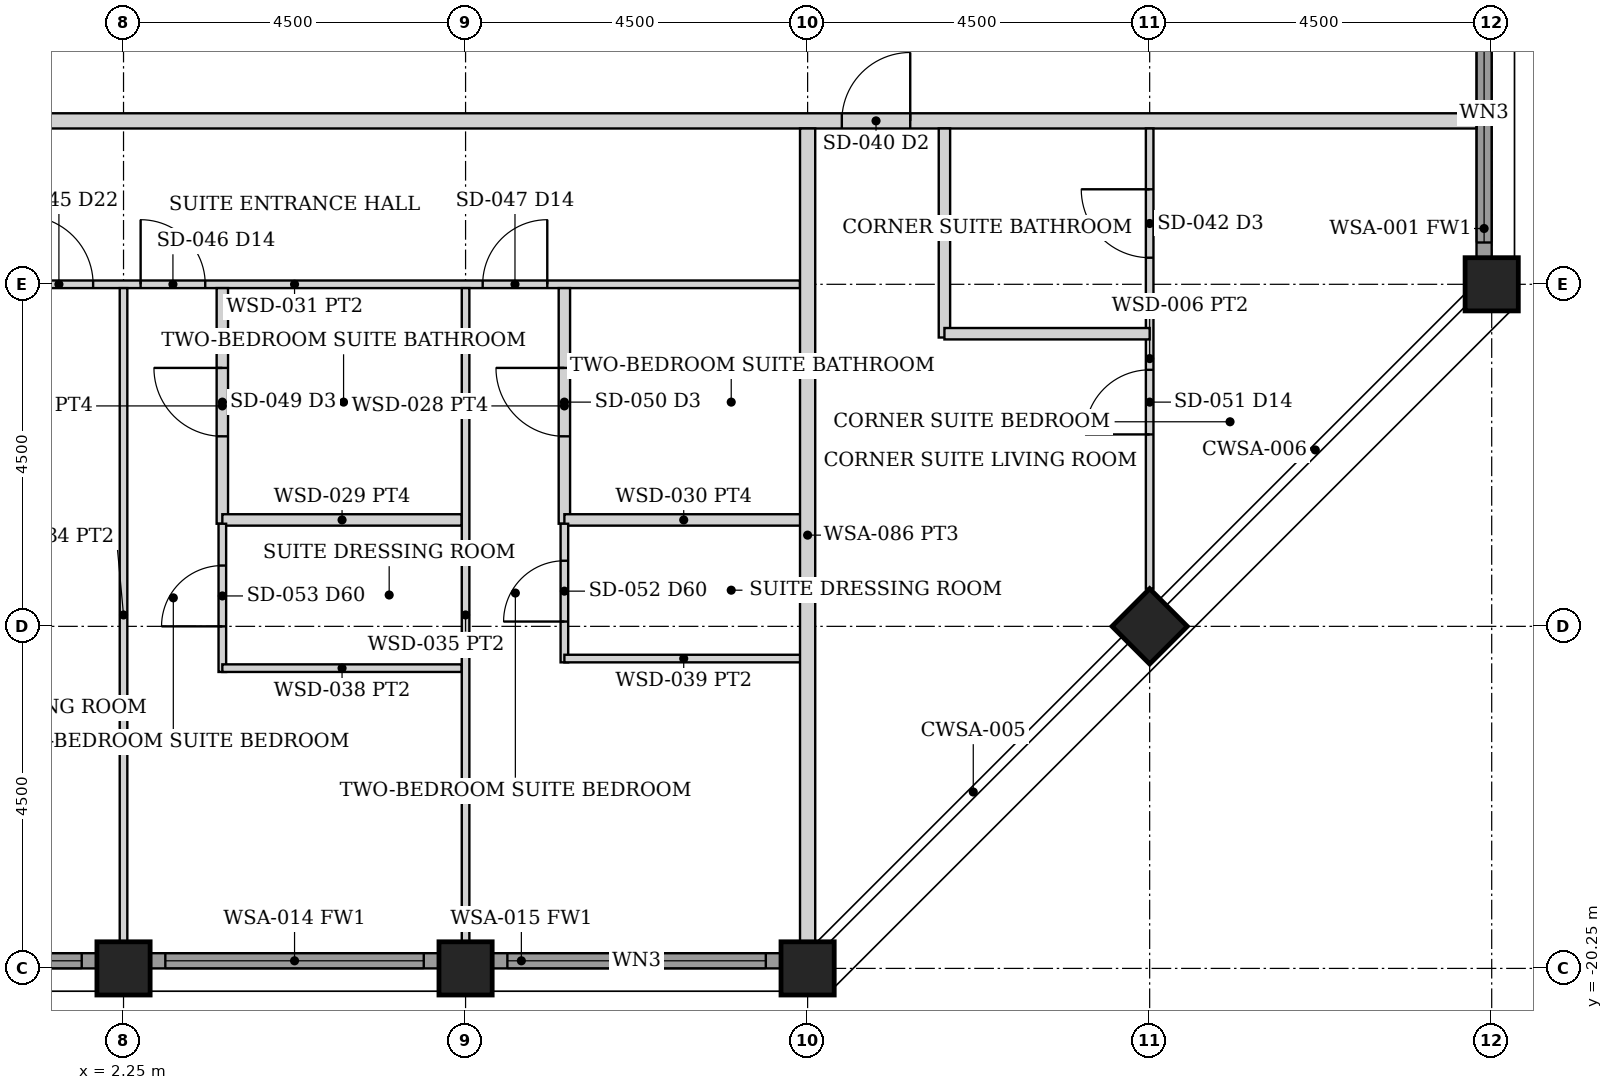
"""IFC4 building model, lengths in metres.
Left out: names, types, materials, properties, quantities, classifications, styles, units other than length and angle.
Written with IfcOpenShell. Run it as: python <this file> out.ifc"""

import sys

from ifc_helpers import new_model, si_unit, direction, frame, frame_2d, origin, origin_2d, place, context, subcontext, project, spatial, rectangle, hollow_rectangle, extrude, element, fill, save


model = new_model("IFC4")
c1 = context("Model", 3, precision=1e-05, world=origin(), true_north=direction((0.0, 1.0)))
c2 = subcontext(c1, "Body", "Model", "MODEL_VIEW")
j1 = project(units=[si_unit("LENGTHUNIT", "METRE"), si_unit("PLANEANGLEUNIT", "RADIAN")], contexts=[c1])
p1 = place(None, origin())
s1 = spatial("IfcSite", under=j1, at=p1, CompositionType="ELEMENT")
p2 = place(p1, origin())
s2 = spatial("IfcBuilding", under=s1, at=p2, CompositionType="ELEMENT")
p3 = place(p2, frame((0.0, 0.0, 234.55)))
s3 = spatial("IfcBuildingStorey", under=s2, at=p3, CompositionType="ELEMENT", Elevation=234.55)
for number, where, z_axis, x_axis in (
    (1, (20.25, -11.25, 0.0), (0.0, 0.0, 1.0), (1.0, 0.0, 0.0)),
    (2, (2.25, -20.25, 0.0), (0.0, 0.0, 1.0), (0.0, 1.0, 0.0)),
    (3, (6.75, -20.25, 0.0), (0.0, 0.0, 1.0), (0.0, 1.0, 0.0)),
    (4, (11.25, -20.25, 0.0), (0.0, 0.0, 1.0), (0.0, 1.0, 0.0)),
    (5, (15.75, -15.75, 0.0), (0.0, 0.0, 1.0), (0.707, -0.707, 0.0)),
):
    element("IfcColumn", number, at=place(p3, frame(where, z_axis=z_axis, x_axis=x_axis)), inside=s3, PredefinedType="COLUMN", context=c2, shape_type="SweptSolid", body=[
        extrude(hollow_rectangle(XDim=0.7, YDim=0.7, WallThickness=0.04, at=origin_2d()), origin(), (0.0, 0.0, 1.0), 3.75),
    ])
p4 = place(p3, frame((-1.895, -20.15, 0.0), z_axis=(0.0, 0.0, 1.0), x_axis=(1.0, 0.0, 0.0)))
e6 = element("IfcWall", 6, at=p4, inside=s3, PredefinedType="SOLIDWALL", context=c2, shape_type="SweptSolid", body=[
    extrude(rectangle(XDim=3.79, YDim=0.2, at=frame_2d((1.895, 0.0))), origin(), (0.0, 0.0, 1.0), 2.629),
])
p5 = place(p4, frame((0.195, 0.0, 0.3)))
e7 = element("IfcOpeningElement", 7, at=p5, cuts=e6, PredefinedType="OPENING", context=c2, shape_type="SweptSolid", body=[
    extrude(rectangle(XDim=3.4, YDim=2.179, at=frame_2d((1.7, 1.089))), frame((0.0, 0.11, 0.0), z_axis=(0.0, -1.0, 0.0), x_axis=(1.0, 0.0, 0.0)), (0.0, 0.0, 1.0), 0.22),
])
p6 = place(p3, frame((2.605, -20.15, 0.0), z_axis=(0.0, 0.0, 1.0), x_axis=(1.0, 0.0, 0.0)))
e8 = element("IfcWall", 8, at=p6, inside=s3, PredefinedType="SOLIDWALL", context=c2, shape_type="SweptSolid", body=[
    extrude(rectangle(XDim=3.79, YDim=0.2, at=frame_2d((1.895, 0.0))), origin(), (0.0, 0.0, 1.0), 2.629),
])
p7 = place(p6, frame((0.195, 0.0, 0.3)))
e9 = element("IfcOpeningElement", 9, at=p7, cuts=e8, PredefinedType="OPENING", context=c2, shape_type="SweptSolid", body=[
    extrude(rectangle(XDim=3.4, YDim=2.179, at=frame_2d((1.7, 1.089))), frame((0.0, 0.11, 0.0), z_axis=(0.0, -1.0, 0.0), x_axis=(1.0, 0.0, 0.0)), (0.0, 0.0, 1.0), 0.22),
])
p8 = place(p3, frame((7.105, -20.15, 0.0), z_axis=(0.0, 0.0, 1.0), x_axis=(1.0, 0.0, 0.0)))
e10 = element("IfcWall", 10, at=p8, inside=s3, PredefinedType="SOLIDWALL", context=c2, shape_type="SweptSolid", body=[
    extrude(rectangle(XDim=3.79, YDim=0.2, at=frame_2d((1.895, 0.0))), origin(), (0.0, 0.0, 1.0), 2.629),
])
p9 = place(p8, frame((0.195, 0.0, 0.3)))
e11 = element("IfcOpeningElement", 11, at=p9, cuts=e10, PredefinedType="OPENING", context=c2, shape_type="SweptSolid", body=[
    extrude(rectangle(XDim=3.4, YDim=2.179, at=frame_2d((1.7, 1.089))), frame((0.0, 0.11, 0.0), z_axis=(0.0, -1.0, 0.0), x_axis=(1.0, 0.0, 0.0)), (0.0, 0.0, 1.0), 0.22),
])
p10 = place(p3, frame((20.15, -10.895, 0.0), z_axis=(0.0, 0.0, 1.0), x_axis=(0.0, 1.0, 0.0)))
e12 = element("IfcWall", 12, at=p10, inside=s3, PredefinedType="SOLIDWALL", context=c2, shape_type="SweptSolid", body=[
    extrude(rectangle(XDim=3.79, YDim=0.2, at=frame_2d((1.895, 0.0))), origin(), (0.0, 0.0, 1.0), 2.629),
])
p11 = place(p10, frame((0.195, 0.0, 0.3)))
e13 = element("IfcOpeningElement", 13, at=p11, cuts=e12, PredefinedType="OPENING", context=c2, shape_type="SweptSolid", body=[
    extrude(rectangle(XDim=3.4, YDim=2.179, at=frame_2d((1.7, 1.089))), frame((0.0, 0.11, 0.0), z_axis=(0.0, -1.0, 0.0), x_axis=(1.0, 0.0, 0.0)), (0.0, 0.0, 1.0), 0.22),
])
p12 = place(p3, frame((-20.05, -9.1, 0.0), z_axis=(0.0, 0.0, 1.0), x_axis=(1.0, 0.0, 0.0)))
e14 = element("IfcWall", 14, at=p12, inside=s3, PredefinedType="PARTITIONING", context=c2, shape_type="SweptSolid", body=[
    extrude(rectangle(XDim=40.1, YDim=0.2, at=frame_2d((20.05, 0.0))), origin(), (0.0, 0.0, 1.0), 2.629),
])
p13 = place(p12, frame((9.0, 0.0, 0.0)))
e15 = element("IfcOpeningElement", 15, at=p13, cuts=e14, PredefinedType="OPENING", context=c2, shape_type="SweptSolid", body=[
    extrude(rectangle(XDim=0.9, YDim=2.1, at=frame_2d((0.45, 1.05))), frame((0.0, 0.11, 0.0), z_axis=(0.0, -1.0, 0.0), x_axis=(1.0, 0.0, 0.0)), (0.0, 0.0, 1.0), 0.22),
])
p14 = place(p12, frame((18.1, 0.0, 0.0)))
e16 = element("IfcOpeningElement", 16, at=p14, cuts=e14, PredefinedType="OPENING", context=c2, shape_type="SweptSolid", body=[
    extrude(rectangle(XDim=0.9, YDim=2.1, at=frame_2d((0.45, 1.05))), frame((0.0, 0.11, 0.0), z_axis=(0.0, -1.0, 0.0), x_axis=(1.0, 0.0, 0.0)), (0.0, 0.0, 1.0), 0.22),
])
p15 = place(p12, frame((31.75, 0.0, 0.0)))
e17 = element("IfcOpeningElement", 17, at=p15, cuts=e14, PredefinedType="OPENING", context=c2, shape_type="SweptSolid", body=[
    extrude(rectangle(XDim=0.9, YDim=2.1, at=frame_2d((0.45, 1.05))), frame((0.0, 0.11, 0.0), z_axis=(0.0, -1.0, 0.0), x_axis=(1.0, 0.0, 0.0)), (0.0, 0.0, 1.0), 0.22),
])
p16 = place(p12, frame((7.45, 0.0, 0.0)))
e18 = element("IfcOpeningElement", 18, at=p16, cuts=e14, PredefinedType="OPENING", context=c2, shape_type="SweptSolid", body=[
    extrude(rectangle(XDim=0.9, YDim=2.1, at=frame_2d((0.45, 1.05))), frame((0.0, 0.11, 0.0), z_axis=(0.0, -1.0, 0.0), x_axis=(1.0, 0.0, 0.0)), (0.0, 0.0, 1.0), 0.22),
])
p17 = place(p3, frame((-2.15, -11.25, 0.0), z_axis=(0.0, 0.0, 1.0), x_axis=(1.0, 0.0, 0.0)))
e19 = element("IfcWall", 19, at=p17, inside=s3, PredefinedType="PARTITIONING", context=c2, shape_type="SweptSolid", body=[
    extrude(rectangle(XDim=13.3, YDim=0.1, at=frame_2d((6.65, 0.0))), origin(), (0.0, 0.0, 1.0), 2.629),
])
p18 = place(p17, frame((0.85, 0.0, 0.0)))
e20 = element("IfcOpeningElement", 20, at=p18, cuts=e19, PredefinedType="OPENING", context=c2, shape_type="SweptSolid", body=[
    extrude(rectangle(XDim=0.9, YDim=2.1, at=frame_2d((0.45, 1.05))), frame((0.0, 0.06, 0.0), z_axis=(0.0, -1.0, 0.0), x_axis=(1.0, 0.0, 0.0)), (0.0, 0.0, 1.0), 0.12),
])
p19 = place(p17, frame((3.1, 0.0, 0.0)))
e21 = element("IfcOpeningElement", 21, at=p19, cuts=e19, PredefinedType="OPENING", context=c2, shape_type="SweptSolid", body=[
    extrude(rectangle(XDim=0.9, YDim=2.1, at=frame_2d((0.45, 1.05))), frame((0.0, 0.06, 0.0), z_axis=(0.0, -1.0, 0.0), x_axis=(1.0, 0.0, 0.0)), (0.0, 0.0, 1.0), 0.12),
])
p20 = place(p17, frame((4.625, 0.0, 0.0)))
e22 = element("IfcOpeningElement", 22, at=p20, cuts=e19, PredefinedType="OPENING", context=c2, shape_type="SweptSolid", body=[
    extrude(rectangle(XDim=0.85, YDim=2.1, at=frame_2d((0.425, 1.05))), frame((0.0, 0.06, 0.0), z_axis=(0.0, -1.0, 0.0), x_axis=(1.0, 0.0, 0.0)), (0.0, 0.0, 1.0), 0.12),
])
p21 = place(p17, frame((9.125, 0.0, 0.0)))
e23 = element("IfcOpeningElement", 23, at=p21, cuts=e19, PredefinedType="OPENING", context=c2, shape_type="SweptSolid", body=[
    extrude(rectangle(XDim=0.85, YDim=2.1, at=frame_2d((0.425, 1.05))), frame((0.0, 0.06, 0.0), z_axis=(0.0, -1.0, 0.0), x_axis=(1.0, 0.0, 0.0)), (0.0, 0.0, 1.0), 0.12),
])
p22 = place(p3, frame((2.25, -19.9, 0.0), z_axis=(0.0, 0.0, 1.0), x_axis=(0.0, 1.0, 0.0)))
e24 = element("IfcWall", 24, at=p22, inside=s3, PredefinedType="PARTITIONING", context=c2, shape_type="SweptSolid", body=[
    extrude(rectangle(XDim=8.6, YDim=0.1, at=frame_2d((4.3, 0.0))), origin(), (0.0, 0.0, 1.0), 2.629),
])
p23 = place(p3, frame((3.55, -14.4, 0.0), z_axis=(0.0, 0.0, 1.0), x_axis=(0.0, 1.0, 0.0)))
e25 = element("IfcWall", 25, at=p23, inside=s3, PredefinedType="PARTITIONING", context=c2, shape_type="SweptSolid", body=[
    extrude(rectangle(XDim=3.1, YDim=0.15, at=frame_2d((1.55, 0.0))), origin(), (0.0, 0.0, 1.0), 2.629),
])
p24 = place(p23, frame((1.15, 0.0, 0.0)))
e26 = element("IfcOpeningElement", 26, at=p24, cuts=e25, PredefinedType="OPENING", context=c2, shape_type="SweptSolid", body=[
    extrude(rectangle(XDim=0.9, YDim=2.1, at=frame_2d((0.45, 1.05))), frame((0.0, 0.085, 0.0), z_axis=(0.0, -1.0, 0.0), x_axis=(1.0, 0.0, 0.0)), (0.0, 0.0, 1.0), 0.17),
])
p25 = place(p3, frame((3.55, -14.35, 0.0), z_axis=(0.0, 0.0, 1.0), x_axis=(1.0, 0.0, 0.0)))
e27 = element("IfcWall", 27, at=p25, inside=s3, PredefinedType="PARTITIONING", context=c2, shape_type="SweptSolid", body=[
    extrude(rectangle(XDim=3.15, YDim=0.15, at=frame_2d((1.575, 0.0))), origin(), (0.0, 0.0, 1.0), 2.629),
])
p26 = place(p3, frame((3.55, -16.35, 0.0), z_axis=(0.0, 0.0, 1.0), x_axis=(0.0, 1.0, 0.0)))
e28 = element("IfcWall", 28, at=p26, inside=s3, PredefinedType="PARTITIONING", context=c2, shape_type="SweptSolid", body=[
    extrude(rectangle(XDim=1.95, YDim=0.1, at=frame_2d((0.975, 0.0))), origin(), (0.0, 0.0, 1.0), 2.629),
])
p27 = place(p26, frame((0.6, 0.0, 0.0)))
e29 = element("IfcOpeningElement", 29, at=p27, cuts=e28, PredefinedType="OPENING", context=c2, shape_type="SweptSolid", body=[
    extrude(rectangle(XDim=0.8, YDim=2.1, at=frame_2d((0.4, 1.05))), frame((0.0, 0.06, 0.0), z_axis=(0.0, -1.0, 0.0), x_axis=(1.0, 0.0, 0.0)), (0.0, 0.0, 1.0), 0.12),
])
p28 = place(p3, frame((3.55, -16.3, 0.0), z_axis=(0.0, 0.0, 1.0), x_axis=(1.0, 0.0, 0.0)))
e30 = element("IfcWall", 30, at=p28, inside=s3, PredefinedType="PARTITIONING", context=c2, shape_type="SweptSolid", body=[
    extrude(rectangle(XDim=3.15, YDim=0.1, at=frame_2d((1.575, 0.0))), origin(), (0.0, 0.0, 1.0), 2.629),
])
p29 = place(p3, frame((6.75, -19.9, 0.0), z_axis=(0.0, 0.0, 1.0), x_axis=(0.0, 1.0, 0.0)))
e31 = element("IfcWall", 31, at=p29, inside=s3, PredefinedType="PARTITIONING", context=c2, shape_type="SweptSolid", body=[
    extrude(rectangle(XDim=8.6, YDim=0.1, at=frame_2d((4.3, 0.0))), origin(), (0.0, 0.0, 1.0), 2.629),
])
p30 = place(p3, frame((8.05, -14.4, 0.0), z_axis=(0.0, 0.0, 1.0), x_axis=(0.0, 1.0, 0.0)))
e32 = element("IfcWall", 32, at=p30, inside=s3, PredefinedType="PARTITIONING", context=c2, shape_type="SweptSolid", body=[
    extrude(rectangle(XDim=3.1, YDim=0.15, at=frame_2d((1.55, 0.0))), origin(), (0.0, 0.0, 1.0), 2.629),
])
p31 = place(p30, frame((1.15, 0.0, 0.0)))
e33 = element("IfcOpeningElement", 33, at=p31, cuts=e32, PredefinedType="OPENING", context=c2, shape_type="SweptSolid", body=[
    extrude(rectangle(XDim=0.9, YDim=2.1, at=frame_2d((0.45, 1.05))), frame((0.0, 0.085, 0.0), z_axis=(0.0, -1.0, 0.0), x_axis=(1.0, 0.0, 0.0)), (0.0, 0.0, 1.0), 0.17),
])
p32 = place(p3, frame((8.05, -14.35, 0.0), z_axis=(0.0, 0.0, 1.0), x_axis=(1.0, 0.0, 0.0)))
e34 = element("IfcWall", 34, at=p32, inside=s3, PredefinedType="PARTITIONING", context=c2, shape_type="SweptSolid", body=[
    extrude(rectangle(XDim=3.14, YDim=0.15, at=frame_2d((1.57, 0.0))), origin(), (0.0, 0.0, 1.0), 2.629),
])
p33 = place(p3, frame((8.05, -16.224, 0.0), z_axis=(0.0, 0.0, 1.0), x_axis=(0.0, 1.0, 0.0)))
e35 = element("IfcWall", 35, at=p33, inside=s3, PredefinedType="PARTITIONING", context=c2, shape_type="SweptSolid", body=[
    extrude(rectangle(XDim=1.824, YDim=0.1, at=frame_2d((0.912, 0.0))), origin(), (0.0, 0.0, 1.0), 2.629),
])
p34 = place(p33, frame((0.537, 0.0, 0.0)))
e36 = element("IfcOpeningElement", 36, at=p34, cuts=e35, PredefinedType="OPENING", context=c2, shape_type="SweptSolid", body=[
    extrude(rectangle(XDim=0.8, YDim=2.1, at=frame_2d((0.4, 1.05))), frame((0.0, 0.06, 0.0), z_axis=(0.0, -1.0, 0.0), x_axis=(1.0, 0.0, 0.0)), (0.0, 0.0, 1.0), 0.12),
])
p35 = place(p3, frame((8.05, -16.174, 0.0), z_axis=(0.0, 0.0, 1.0), x_axis=(1.0, 0.0, 0.0)))
e37 = element("IfcWall", 37, at=p35, inside=s3, PredefinedType="PARTITIONING", context=c2, shape_type="SweptSolid", body=[
    extrude(rectangle(XDim=3.14, YDim=0.1, at=frame_2d((1.57, 0.0))), origin(), (0.0, 0.0, 1.0), 2.629),
])
p36 = place(p3, frame((11.25, -19.9, 0.0), z_axis=(0.0, 0.0, 1.0), x_axis=(0.0, 1.0, 0.0)))
e38 = element("IfcWall", 38, at=p36, inside=s3, PredefinedType="PARTITIONING", context=c2, shape_type="SweptSolid", body=[
    extrude(rectangle(XDim=10.7, YDim=0.2, at=frame_2d((5.35, 0.0))), origin(), (0.0, 0.0, 1.0), 2.629),
])
p37 = place(p3, frame((15.75, -15.255, 0.0), z_axis=(0.0, 0.0, 1.0), x_axis=(0.0, 1.0, 0.0)))
e39 = element("IfcWall", 39, at=p37, inside=s3, PredefinedType="PARTITIONING", context=c2, shape_type="SweptSolid", body=[
    extrude(rectangle(XDim=6.055, YDim=0.1, at=frame_2d((3.027, 0.0))), origin(), (0.0, 0.0, 1.0), 2.629),
])
p38 = place(p37, frame((2.03, 0.0, 0.0)))
e40 = element("IfcOpeningElement", 40, at=p38, cuts=e39, PredefinedType="OPENING", context=c2, shape_type="SweptSolid", body=[
    extrude(rectangle(XDim=0.85, YDim=2.1, at=frame_2d((0.425, 1.05))), frame((0.0, 0.06, 0.0), z_axis=(0.0, -1.0, 0.0), x_axis=(1.0, 0.0, 0.0)), (0.0, 0.0, 1.0), 0.12),
])
p39 = place(p37, frame((4.355, 0.0, 0.0)))
e41 = element("IfcOpeningElement", 41, at=p39, cuts=e39, PredefinedType="OPENING", context=c2, shape_type="SweptSolid", body=[
    extrude(rectangle(XDim=0.9, YDim=2.1, at=frame_2d((0.45, 1.05))), frame((0.0, 0.06, 0.0), z_axis=(0.0, -1.0, 0.0), x_axis=(1.0, 0.0, 0.0)), (0.0, 0.0, 1.0), 0.12),
])
p40 = place(p3, frame((13.05, -11.95, 0.0), z_axis=(0.0, 0.0, 1.0), x_axis=(0.0, 1.0, 0.0)))
e42 = element("IfcWall", 42, at=p40, inside=s3, PredefinedType="PARTITIONING", context=c2, shape_type="SweptSolid", body=[
    extrude(rectangle(XDim=2.75, YDim=0.15, at=frame_2d((1.375, 0.0))), origin(), (0.0, 0.0, 1.0), 2.629),
])
p41 = place(p3, frame((13.05, -11.9, 0.0), z_axis=(0.0, 0.0, 1.0), x_axis=(1.0, 0.0, 0.0)))
e43 = element("IfcWall", 43, at=p41, inside=s3, PredefinedType="PARTITIONING", context=c2, shape_type="SweptSolid", body=[
    extrude(rectangle(XDim=2.7, YDim=0.15, at=frame_2d((1.35, 0.0))), origin(), (0.0, 0.0, 1.0), 2.629),
])
p42 = place(p5, origin())
e44 = element("IfcWindow", 44, at=p42, inside=s3, PartitioningType="SINGLE_PANEL", PredefinedType="WINDOW", context=c2, shape_type="SweptSolid", body=[
    extrude(rectangle(XDim=3.4, YDim=2.179, at=frame_2d((1.7, 1.089))), frame((0.0, 0.03, 0.0), z_axis=(0.0, -1.0, 0.0), x_axis=(1.0, 0.0, 0.0)), (0.0, 0.0, 1.0), 0.06),
])
fill(e7, e44)
p43 = place(p7, origin())
e45 = element("IfcWindow", 45, at=p43, inside=s3, PartitioningType="SINGLE_PANEL", PredefinedType="WINDOW", context=c2, shape_type="SweptSolid", body=[
    extrude(rectangle(XDim=3.4, YDim=2.179, at=frame_2d((1.7, 1.089))), frame((0.0, 0.03, 0.0), z_axis=(0.0, -1.0, 0.0), x_axis=(1.0, 0.0, 0.0)), (0.0, 0.0, 1.0), 0.06),
])
fill(e9, e45)
p44 = place(p9, origin())
e46 = element("IfcWindow", 46, at=p44, inside=s3, PartitioningType="SINGLE_PANEL", PredefinedType="WINDOW", context=c2, shape_type="SweptSolid", body=[
    extrude(rectangle(XDim=3.4, YDim=2.179, at=frame_2d((1.7, 1.089))), frame((0.0, 0.03, 0.0), z_axis=(0.0, -1.0, 0.0), x_axis=(1.0, 0.0, 0.0)), (0.0, 0.0, 1.0), 0.06),
])
fill(e11, e46)
p45 = place(p11, origin())
e47 = element("IfcWindow", 47, at=p45, inside=s3, PartitioningType="SINGLE_PANEL", PredefinedType="WINDOW", context=c2, shape_type="SweptSolid", body=[
    extrude(rectangle(XDim=3.4, YDim=2.179, at=frame_2d((1.7, 1.089))), frame((0.0, 0.03, 0.0), z_axis=(0.0, -1.0, 0.0), x_axis=(1.0, 0.0, 0.0)), (0.0, 0.0, 1.0), 0.06),
])
fill(e13, e47)
p46 = place(p19, origin())
e48 = element("IfcDoor", 48, at=p46, inside=s3, OperationType="SINGLE_SWING_LEFT", PredefinedType="DOOR", context=c2, shape_type="SweptSolid", body=[
    extrude(rectangle(XDim=0.9, YDim=2.1, at=frame_2d((0.45, 1.05))), frame((0.0, 0.025, 0.0), z_axis=(0.0, -1.0, 0.0), x_axis=(1.0, 0.0, 0.0)), (0.0, 0.0, 1.0), 0.05),
])
fill(e21, e48)
p47 = place(p20, origin())
e49 = element("IfcDoor", 49, at=p47, inside=s3, OperationType="SINGLE_SWING_LEFT", PredefinedType="DOOR", context=c2, shape_type="SweptSolid", body=[
    extrude(rectangle(XDim=0.85, YDim=2.1, at=frame_2d((0.425, 1.05))), frame((0.0, 0.025, 0.0), z_axis=(0.0, -1.0, 0.0), x_axis=(1.0, 0.0, 0.0)), (0.0, 0.0, 1.0), 0.05),
])
fill(e22, e49)
p48 = place(p24, origin())
e50 = element("IfcDoor", 50, at=p48, inside=s3, OperationType="SINGLE_SWING_RIGHT", PredefinedType="DOOR", context=c2, shape_type="SweptSolid", body=[
    extrude(rectangle(XDim=0.9, YDim=2.1, at=frame_2d((0.45, 1.05))), frame((0.0, 0.025, 0.0), z_axis=(0.0, -1.0, 0.0), x_axis=(1.0, 0.0, 0.0)), (0.0, 0.0, 1.0), 0.05),
])
fill(e26, e50)
p49 = place(p27, origin())
e51 = element("IfcDoor", 51, at=p49, inside=s3, OperationType="SINGLE_SWING_LEFT", PredefinedType="DOOR", context=c2, shape_type="SweptSolid", body=[
    extrude(rectangle(XDim=0.8, YDim=2.1, at=frame_2d((0.4, 1.05))), frame((0.0, 0.025, 0.0), z_axis=(0.0, -1.0, 0.0), x_axis=(1.0, 0.0, 0.0)), (0.0, 0.0, 1.0), 0.05),
])
fill(e29, e51)
p50 = place(p21, origin())
e52 = element("IfcDoor", 52, at=p50, inside=s3, OperationType="SINGLE_SWING_RIGHT", PredefinedType="DOOR", context=c2, shape_type="SweptSolid", body=[
    extrude(rectangle(XDim=0.85, YDim=2.1, at=frame_2d((0.425, 1.05))), frame((0.0, 0.025, 0.0), z_axis=(0.0, -1.0, 0.0), x_axis=(1.0, 0.0, 0.0)), (0.0, 0.0, 1.0), 0.05),
])
fill(e23, e52)
p51 = place(p31, origin())
e53 = element("IfcDoor", 53, at=p51, inside=s3, OperationType="SINGLE_SWING_RIGHT", PredefinedType="DOOR", context=c2, shape_type="SweptSolid", body=[
    extrude(rectangle(XDim=0.9, YDim=2.1, at=frame_2d((0.45, 1.05))), frame((0.0, 0.025, 0.0), z_axis=(0.0, -1.0, 0.0), x_axis=(1.0, 0.0, 0.0)), (0.0, 0.0, 1.0), 0.05),
])
fill(e33, e53)
p52 = place(p34, origin())
e54 = element("IfcDoor", 54, at=p52, inside=s3, OperationType="SINGLE_SWING_LEFT", PredefinedType="DOOR", context=c2, shape_type="SweptSolid", body=[
    extrude(rectangle(XDim=0.8, YDim=2.1, at=frame_2d((0.4, 1.05))), frame((0.0, 0.025, 0.0), z_axis=(0.0, -1.0, 0.0), x_axis=(1.0, 0.0, 0.0)), (0.0, 0.0, 1.0), 0.05),
])
fill(e36, e54)
p53 = place(p15, origin())
e55 = element("IfcDoor", 55, at=p53, inside=s3, OperationType="SINGLE_SWING_RIGHT", PredefinedType="DOOR", context=c2, shape_type="SweptSolid", body=[
    extrude(rectangle(XDim=0.9, YDim=2.1, at=frame_2d((0.45, 1.05))), frame((0.0, 0.025, 0.0), z_axis=(0.0, -1.0, 0.0), x_axis=(1.0, 0.0, 0.0)), (0.0, 0.0, 1.0), 0.05),
])
fill(e17, e55)
p54 = place(p38, origin())
e56 = element("IfcDoor", 56, at=p54, inside=s3, OperationType="SINGLE_SWING_LEFT", PredefinedType="DOOR", context=c2, shape_type="SweptSolid", body=[
    extrude(rectangle(XDim=0.85, YDim=2.1, at=frame_2d((0.425, 1.05))), frame((0.0, 0.025, 0.0), z_axis=(0.0, -1.0, 0.0), x_axis=(1.0, 0.0, 0.0)), (0.0, 0.0, 1.0), 0.05),
])
fill(e40, e56)
p55 = place(p39, origin())
e57 = element("IfcDoor", 57, at=p55, inside=s3, OperationType="SINGLE_SWING_RIGHT", PredefinedType="DOOR", context=c2, shape_type="SweptSolid", body=[
    extrude(rectangle(XDim=0.9, YDim=2.1, at=frame_2d((0.45, 1.05))), frame((0.0, 0.025, 0.0), z_axis=(0.0, -1.0, 0.0), x_axis=(1.0, 0.0, 0.0)), (0.0, 0.0, 1.0), 0.05),
])
fill(e41, e57)
save(model, sys.argv[1])
